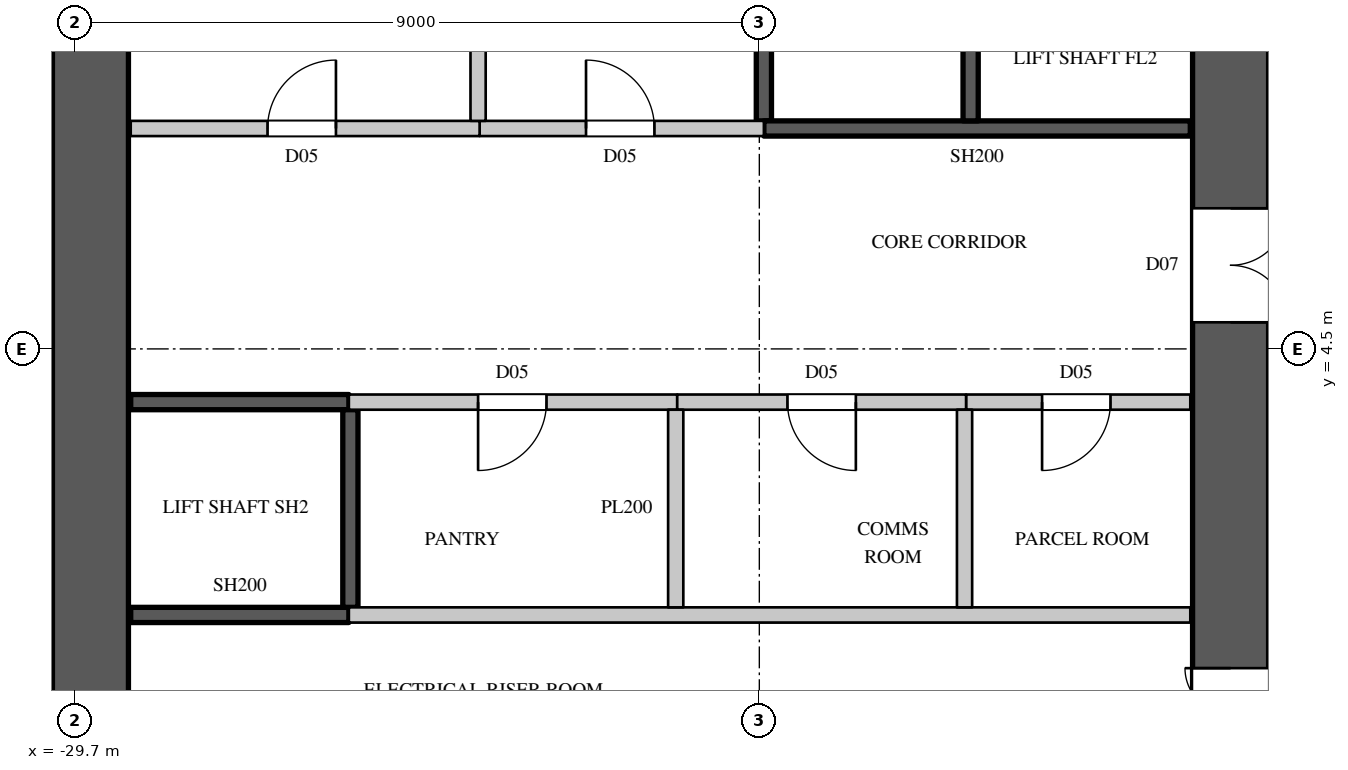
"""IFC4 building model, lengths in metres.
Left out: names, types, materials, properties, quantities, classifications, styles, units other than length and angle.
Written with IfcOpenShell. Run it as: python <this file> out.ifc"""

import sys

from ifc_helpers import new_model, si_unit, direction, frame, frame_2d, origin, place, context, subcontext, project, spatial, rectangle, extrude, element, fill, save


model = new_model("IFC4")
c1 = context("Model", 3, precision=1e-05, world=origin(), true_north=direction((0.0, 1.0)))
c2 = subcontext(c1, "Body", "Model", "MODEL_VIEW")
j1 = project(units=[si_unit("LENGTHUNIT", "METRE"), si_unit("PLANEANGLEUNIT", "RADIAN")], contexts=[c1])
p1 = place(None, origin())
s1 = spatial("IfcSite", under=j1, at=p1, CompositionType="ELEMENT")
p2 = place(p1, origin())
s2 = spatial("IfcBuilding", under=s1, at=p2, CompositionType="ELEMENT")
p3 = place(p2, frame((0.0, 0.0, 91.5)))
s3 = spatial("IfcBuildingStorey", under=s2, at=p3, CompositionType="ELEMENT", Elevation=91.5)
p4 = place(p3, frame((-14.5, -14.8, 0.0), z_axis=(0.0, 0.0, 1.0), x_axis=(0.0, 1.0, 0.0)))
e1 = element("IfcWall", 1, at=p4, inside=s3, PredefinedType="SHEAR", context=c2, shape_type="SweptSolid", body=[
    extrude(rectangle(XDim=29.6, YDim=1.0, at=frame_2d((14.8, 0.0))), origin(), (0.0, 0.0, 1.0), 3.6),
])
p5 = place(p4, frame((8.45, 0.0, 0.0)))
e2 = element("IfcOpeningElement", 2, at=p5, cuts=e1, PredefinedType="OPENING", context=c2, shape_type="SweptSolid", body=[
    extrude(rectangle(XDim=1.5, YDim=2.4, at=frame_2d((0.75, 1.2))), frame((0.0, 0.51, 0.0), z_axis=(0.0, -1.0, 0.0), x_axis=(1.0, 0.0, 0.0)), (0.0, 0.0, 1.0), 1.02),
])
p6 = place(p4, frame((19.65, 0.0, 0.0)))
e3 = element("IfcOpeningElement", 3, at=p6, cuts=e1, PredefinedType="OPENING", context=c2, shape_type="SweptSolid", body=[
    extrude(rectangle(XDim=1.5, YDim=2.4, at=frame_2d((0.75, 1.2))), frame((0.0, 0.51, 0.0), z_axis=(0.0, -1.0, 0.0), x_axis=(1.0, 0.0, 0.0)), (0.0, 0.0, 1.0), 1.02),
])
p7 = place(p4, frame((14.5, 0.0, 0.0)))
e4 = element("IfcOpeningElement", 4, at=p7, cuts=e1, PredefinedType="OPENING", context=c2, shape_type="SweptSolid", body=[
    extrude(rectangle(XDim=0.6, YDim=2.0, at=frame_2d((0.3, 1.0))), frame((0.0, 0.51, 0.0), z_axis=(0.0, -1.0, 0.0), x_axis=(1.0, 0.0, 0.0)), (0.0, 0.0, 1.0), 1.02),
])
p8 = place(p3, frame((-29.5, -10.2, 0.0), z_axis=(0.0, 0.0, 1.0), x_axis=(0.0, 1.0, 0.0)))
e5 = element("IfcWall", 5, at=p8, inside=s3, PredefinedType="SHEAR", context=c2, shape_type="SweptSolid", body=[
    extrude(rectangle(XDim=20.4, YDim=1.0, at=frame_2d((10.2, 0.0))), origin(), (0.0, 0.0, 1.0), 3.6),
])
p9 = place(p3, frame((-26.1, 3.8, 0.0), z_axis=(0.0, 0.0, 1.0), x_axis=(1.0, 0.0, 0.0)))
e6 = element("IfcWall", 6, at=p9, inside=s3, PredefinedType="PARTITIONING", context=c2, shape_type="SweptSolid", body=[
    extrude(rectangle(XDim=4.32, YDim=0.2, at=frame_2d((2.16, 0.0))), origin(), (0.0, 0.0, 1.0), 3.3),
])
p10 = place(p9, frame((1.7, 0.0, 0.0)))
e7 = element("IfcOpeningElement", 7, at=p10, cuts=e6, PredefinedType="OPENING", context=c2, shape_type="SweptSolid", body=[
    extrude(rectangle(XDim=0.9, YDim=2.2, at=frame_2d((0.45, 1.1))), frame((0.0, 0.11, 0.0), z_axis=(0.0, -1.0, 0.0), x_axis=(1.0, 0.0, 0.0)), (0.0, 0.0, 1.0), 0.22),
])
p11 = place(p3, frame((-24.38, 7.4, 0.0), z_axis=(0.0, 0.0, 1.0), x_axis=(1.0, 0.0, 0.0)))
e8 = element("IfcWall", 8, at=p11, inside=s3, PredefinedType="PARTITIONING", context=c2, shape_type="SweptSolid", body=[
    extrude(rectangle(XDim=3.74, YDim=0.2, at=frame_2d((1.87, 0.0))), origin(), (0.0, 0.0, 1.0), 3.3),
])
p12 = place(p11, frame((1.4, 0.0, 0.0)))
e9 = element("IfcOpeningElement", 9, at=p12, cuts=e8, PredefinedType="OPENING", context=c2, shape_type="SweptSolid", body=[
    extrude(rectangle(XDim=0.9, YDim=2.2, at=frame_2d((0.45, 1.1))), frame((0.0, 0.11, 0.0), z_axis=(0.0, -1.0, 0.0), x_axis=(1.0, 0.0, 0.0)), (0.0, 0.0, 1.0), 0.22),
])
p13 = place(p3, frame((-17.98, 3.8, 0.0), z_axis=(0.0, 0.0, 1.0), x_axis=(1.0, 0.0, 0.0)))
e10 = element("IfcWall", 10, at=p13, inside=s3, PredefinedType="PARTITIONING", context=c2, shape_type="SweptSolid", body=[
    extrude(rectangle(XDim=2.95, YDim=0.2, at=frame_2d((1.475, 0.0))), origin(), (0.0, 0.0, 1.0), 3.3),
])
p14 = place(p13, frame((1.0, 0.0, 0.0)))
e11 = element("IfcOpeningElement", 11, at=p14, cuts=e10, PredefinedType="OPENING", context=c2, shape_type="SweptSolid", body=[
    extrude(rectangle(XDim=0.9, YDim=2.2, at=frame_2d((0.45, 1.1))), frame((0.0, 0.11, 0.0), z_axis=(0.0, -1.0, 0.0), x_axis=(1.0, 0.0, 0.0)), (0.0, 0.0, 1.0), 0.22),
])
p15 = place(p3, frame((-28.97, 7.4, 0.0), z_axis=(0.0, 0.0, 1.0), x_axis=(1.0, 0.0, 0.0)))
e12 = element("IfcWall", 12, at=p15, inside=s3, PredefinedType="PARTITIONING", context=c2, shape_type="SweptSolid", body=[
    extrude(rectangle(XDim=4.59, YDim=0.2, at=frame_2d((2.295, 0.0))), origin(), (0.0, 0.0, 1.0), 3.3),
])
p16 = place(p15, frame((1.8, 0.0, 0.0)))
e13 = element("IfcOpeningElement", 13, at=p16, cuts=e12, PredefinedType="OPENING", context=c2, shape_type="SweptSolid", body=[
    extrude(rectangle(XDim=0.9, YDim=2.2, at=frame_2d((0.45, 1.1))), frame((0.0, 0.11, 0.0), z_axis=(0.0, -1.0, 0.0), x_axis=(1.0, 0.0, 0.0)), (0.0, 0.0, 1.0), 0.22),
])
p17 = place(p3, frame((-26.1, 1.0, 0.0), z_axis=(0.0, 0.0, 1.0), x_axis=(1.0, 0.0, 0.0)))
e14 = element("IfcWall", 14, at=p17, inside=s3, PredefinedType="PARTITIONING", context=c2, shape_type="SweptSolid", body=[
    extrude(rectangle(XDim=11.07, YDim=0.2, at=frame_2d((5.535, 0.0))), origin(), (0.0, 0.0, 1.0), 3.3),
])
p18 = place(p3, frame((-24.4, 7.5, 0.0), z_axis=(0.0, 0.0, 1.0), x_axis=(0.0, 1.0, 0.0)))
e15 = element("IfcWall", 15, at=p18, inside=s3, PredefinedType="PARTITIONING", context=c2, shape_type="SweptSolid", body=[
    extrude(rectangle(XDim=2.575, YDim=0.2, at=frame_2d((1.288, 0.0))), origin(), (0.0, 0.0, 1.0), 3.3),
])
p19 = place(p3, frame((-21.78, 3.8, 0.0), z_axis=(0.0, 0.0, 1.0), x_axis=(1.0, 0.0, 0.0)))
e16 = element("IfcWall", 16, at=p19, inside=s3, PredefinedType="PARTITIONING", context=c2, shape_type="SweptSolid", body=[
    extrude(rectangle(XDim=3.8, YDim=0.2, at=frame_2d((1.9, 0.0))), origin(), (0.0, 0.0, 1.0), 3.3),
])
p20 = place(p19, frame((1.45, 0.0, 0.0)))
e17 = element("IfcOpeningElement", 17, at=p20, cuts=e16, PredefinedType="OPENING", context=c2, shape_type="SweptSolid", body=[
    extrude(rectangle(XDim=0.9, YDim=2.2, at=frame_2d((0.45, 1.1))), frame((0.0, 0.11, 0.0), z_axis=(0.0, -1.0, 0.0), x_axis=(1.0, 0.0, 0.0)), (0.0, 0.0, 1.0), 0.22),
])
for number, where, z_axis, x_axis in (
    (18, (-21.8, 1.1, 0.0), (0.0, 0.0, 1.0), (0.0, 1.0, 0.0)),
    (19, (-18.0, 1.1, 0.0), (0.0, 0.0, 1.0), (0.0, 1.0, 0.0)),
):
    element("IfcWall", number, at=place(p3, frame(where, z_axis=z_axis, x_axis=x_axis)), inside=s3, PredefinedType="PARTITIONING", context=c2, shape_type="SweptSolid", body=[
        extrude(rectangle(XDim=2.6, YDim=0.2, at=frame_2d((1.3, 0.0))), origin(), (0.0, 0.0, 1.0), 3.3),
    ])
for number, where, z_axis, x_axis in (
    (20, (-28.97, 1.0, 0.0), (0.0, 0.0, 1.0), (1.0, 0.0, 0.0)),
    (21, (-28.97, 3.8, 0.0), (0.0, 0.0, 1.0), (1.0, 0.0, 0.0)),
):
    element("IfcWall", number, at=place(p3, frame(where, z_axis=z_axis, x_axis=x_axis)), inside=s3, PredefinedType="SHEAR", context=c2, shape_type="SweptSolid", body=[
        extrude(rectangle(XDim=2.87, YDim=0.2, at=frame_2d((1.435, 0.0))), origin(), (0.0, 0.0, 1.0), 3.3),
    ])
p21 = place(p3, frame((-26.08, 1.1, 0.0), z_axis=(0.0, 0.0, 1.0), x_axis=(0.0, 1.0, 0.0)))
e22 = element("IfcWall", 22, at=p21, inside=s3, PredefinedType="SHEAR", context=c2, shape_type="SweptSolid", body=[
    extrude(rectangle(XDim=2.6, YDim=0.2, at=frame_2d((1.3, 0.0))), origin(), (0.0, 0.0, 1.0), 3.3),
])
p22 = place(p3, frame((-20.64, 7.5, 0.0), z_axis=(0.0, 0.0, 1.0), x_axis=(0.0, 1.0, 0.0)))
e23 = element("IfcWall", 23, at=p22, inside=s3, PredefinedType="SHEAR", context=c2, shape_type="SweptSolid", body=[
    extrude(rectangle(XDim=2.575, YDim=0.2, at=frame_2d((1.288, 0.0))), origin(), (0.0, 0.0, 1.0), 3.3),
])
p23 = place(p3, frame((-20.64, 7.4, 0.0), z_axis=(0.0, 0.0, 1.0), x_axis=(1.0, 0.0, 0.0)))
e24 = element("IfcWall", 24, at=p23, inside=s3, PredefinedType="SHEAR", context=c2, shape_type="SweptSolid", body=[
    extrude(rectangle(XDim=5.61, YDim=0.2, at=frame_2d((2.805, 0.0))), origin(), (0.0, 0.0, 1.0), 3.3),
])
p24 = place(p3, frame((-17.92, 7.5, 0.0), z_axis=(0.0, 0.0, 1.0), x_axis=(0.0, 1.0, 0.0)))
e25 = element("IfcWall", 25, at=p24, inside=s3, PredefinedType="SHEAR", context=c2, shape_type="SweptSolid", body=[
    extrude(rectangle(XDim=2.6, YDim=0.2, at=frame_2d((1.3, 0.0))), origin(), (0.0, 0.0, 1.0), 3.6),
])
p25 = place(p10, origin())
e26 = element("IfcDoor", 26, at=p25, inside=s3, OperationType="SINGLE_SWING_RIGHT", PredefinedType="DOOR", context=c2, shape_type="SweptSolid", body=[
    extrude(rectangle(XDim=0.9, YDim=2.2, at=frame_2d((0.45, 1.1))), frame((0.0, 0.025, 0.0), z_axis=(0.0, -1.0, 0.0), x_axis=(1.0, 0.0, 0.0)), (0.0, 0.0, 1.0), 0.05),
])
fill(e7, e26)
p26 = place(p20, origin())
e27 = element("IfcDoor", 27, at=p26, inside=s3, OperationType="SINGLE_SWING_LEFT", PredefinedType="DOOR", context=c2, shape_type="SweptSolid", body=[
    extrude(rectangle(XDim=0.9, YDim=2.2, at=frame_2d((0.45, 1.1))), frame((0.0, 0.025, 0.0), z_axis=(0.0, -1.0, 0.0), x_axis=(1.0, 0.0, 0.0)), (0.0, 0.0, 1.0), 0.05),
])
fill(e17, e27)
p27 = place(p14, origin())
e28 = element("IfcDoor", 28, at=p27, inside=s3, OperationType="SINGLE_SWING_RIGHT", PredefinedType="DOOR", context=c2, shape_type="SweptSolid", body=[
    extrude(rectangle(XDim=0.9, YDim=2.2, at=frame_2d((0.45, 1.1))), frame((0.0, 0.025, 0.0), z_axis=(0.0, -1.0, 0.0), x_axis=(1.0, 0.0, 0.0)), (0.0, 0.0, 1.0), 0.05),
])
fill(e11, e28)
p28 = place(p16, origin())
e29 = element("IfcDoor", 29, at=p28, inside=s3, OperationType="SINGLE_SWING_RIGHT", PredefinedType="DOOR", context=c2, shape_type="SweptSolid", body=[
    extrude(rectangle(XDim=0.9, YDim=2.2, at=frame_2d((0.45, 1.1))), frame((0.0, 0.025, 0.0), z_axis=(0.0, -1.0, 0.0), x_axis=(1.0, 0.0, 0.0)), (0.0, 0.0, 1.0), 0.05),
])
fill(e13, e29)
p29 = place(p12, origin())
e30 = element("IfcDoor", 30, at=p29, inside=s3, OperationType="SINGLE_SWING_LEFT", PredefinedType="DOOR", context=c2, shape_type="SweptSolid", body=[
    extrude(rectangle(XDim=0.9, YDim=2.2, at=frame_2d((0.45, 1.1))), frame((0.0, 0.025, 0.0), z_axis=(0.0, -1.0, 0.0), x_axis=(1.0, 0.0, 0.0)), (0.0, 0.0, 1.0), 0.05),
])
fill(e9, e30)
p30 = place(p6, origin())
e31 = element("IfcDoor", 31, at=p30, inside=s3, OperationType="DOUBLE_DOOR_SINGLE_SWING", PredefinedType="DOOR", context=c2, shape_type="SweptSolid", body=[
    extrude(rectangle(XDim=1.5, YDim=2.4, at=frame_2d((0.75, 1.2))), frame((0.0, -0.445, 0.0), z_axis=(0.0, -1.0, 0.0), x_axis=(1.0, 0.0, 0.0)), (0.0, 0.0, 1.0), 0.05),
])
fill(e3, e31)
p31 = place(p7, origin())
e32 = element("IfcDoor", 32, at=p31, inside=s3, OperationType="SINGLE_SWING_RIGHT", PredefinedType="DOOR", context=c2, shape_type="SweptSolid", body=[
    extrude(rectangle(XDim=0.6, YDim=2.0, at=frame_2d((0.3, 1.0))), frame((0.0, 0.495, 0.0), z_axis=(0.0, -1.0, 0.0), x_axis=(1.0, 0.0, 0.0)), (0.0, 0.0, 1.0), 0.05),
])
fill(e4, e32)
save(model, sys.argv[1])
